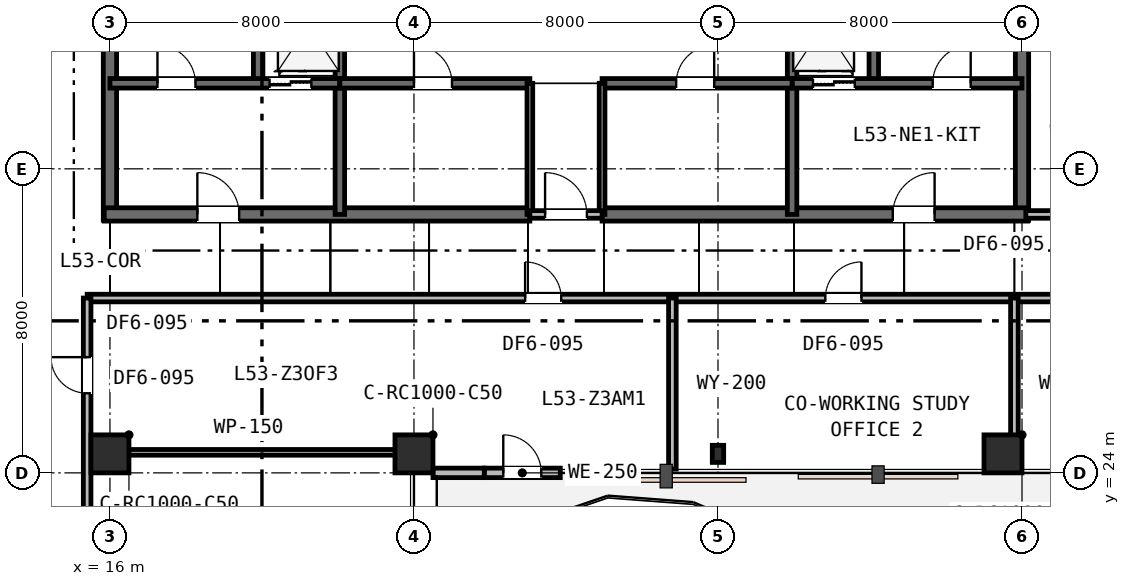
"""IFC4 building model, lengths in metres.
Left out: names, types, materials, properties, quantities, classifications, styles, units other than length and angle.
Written with IfcOpenShell. Run it as: python <this file> out.ifc"""

import sys

from ifc_helpers import new_model, si_unit, direction, frame, frame_2d, origin, origin_2d, place, context, subcontext, project, spatial, rectangle, i_section, extrude, element, fill, save


model = new_model("IFC4")
c1 = context("Model", 3, precision=1e-05, world=origin(), true_north=direction((0.0, 1.0)))
c2 = subcontext(c1, "Body", "Model", "MODEL_VIEW")
j1 = project(units=[si_unit("LENGTHUNIT", "METRE"), si_unit("PLANEANGLEUNIT", "RADIAN")], contexts=[c1])
p1 = place(None, origin())
s1 = spatial("IfcSite", under=j1, at=p1, CompositionType="ELEMENT")
p2 = place(p1, origin())
s2 = spatial("IfcBuilding", under=s1, at=p2, CompositionType="ELEMENT")
p3 = place(p2, frame((0.0, 0.0, 204.6)))
s3 = spatial("IfcBuildingStorey", under=s2, at=p3, CompositionType="ELEMENT", Elevation=204.6)
for number, where, z_axis, x_axis in (
    (1, (16.0, 30.65, 0.0), (0.0, 0.0, 1.0), (0.0, 1.0, 0.0)),
    (2, (40.0, 30.65, 0.0), (0.0, 0.0, 1.0), (0.0, 1.0, 0.0)),
):
    element("IfcWall", number, at=place(p3, frame(where, z_axis=z_axis, x_axis=x_axis)), inside=s3, PredefinedType="SHEAR", context=c2, shape_type="SweptSolid", body=[
        extrude(rectangle(XDim=12.3, YDim=0.35, at=frame_2d((6.15, 0.0))), origin(), (0.0, 0.0, 1.0), 3.6),
    ])
p4 = place(p3, frame((15.85, 30.8, 0.0), z_axis=(0.0, 0.0, 1.0), x_axis=(1.0, 0.0, 0.0)))
e3 = element("IfcWall", 3, at=p4, inside=s3, PredefinedType="SHEAR", context=c2, shape_type="SweptSolid", body=[
    extrude(rectangle(XDim=11.2, YDim=0.35, at=frame_2d((5.6, 0.0))), origin(), (0.0, 0.0, 1.0), 3.6),
])
p5 = place(p4, frame((2.45, 0.0, 0.0)))
e4 = element("IfcOpeningElement", 4, at=p5, cuts=e3, PredefinedType="OPENING", context=c2, shape_type="SweptSolid", body=[
    extrude(rectangle(XDim=1.1, YDim=2.15, at=frame_2d((0.55, 1.075))), frame((0.0, 0.185, 0.0), z_axis=(0.0, -1.0, 0.0), x_axis=(1.0, 0.0, 0.0)), (0.0, 0.0, 1.0), 0.37),
])
p6 = place(p3, frame((28.95, 30.8, 0.0), z_axis=(0.0, 0.0, 1.0), x_axis=(1.0, 0.0, 0.0)))
e5 = element("IfcWall", 5, at=p6, inside=s3, PredefinedType="SHEAR", context=c2, shape_type="SweptSolid", body=[
    extrude(rectangle(XDim=11.2, YDim=0.35, at=frame_2d((5.6, 0.0))), origin(), (0.0, 0.0, 1.0), 3.6),
])
p7 = place(p6, frame((7.65, 0.0, 0.0)))
e6 = element("IfcOpeningElement", 6, at=p7, cuts=e5, PredefinedType="OPENING", context=c2, shape_type="SweptSolid", body=[
    extrude(rectangle(XDim=1.1, YDim=2.15, at=frame_2d((0.55, 1.075))), frame((0.0, 0.185, 0.0), z_axis=(0.0, -1.0, 0.0), x_axis=(1.0, 0.0, 0.0)), (0.0, 0.0, 1.0), 0.37),
])
for number, where, z_axis, x_axis in (
    (7, (19.9, 34.25, 0.0), (0.0, 0.0, 1.0), (0.0, 1.0, 0.0)),
    (8, (36.1, 34.25, 0.0), (0.0, 0.0, 1.0), (0.0, 1.0, 0.0)),
):
    element("IfcWall", number, at=place(p3, frame(where, z_axis=z_axis, x_axis=x_axis)), inside=s3, PredefinedType="SHEAR", context=c2, shape_type="SweptSolid", body=[
        extrude(rectangle(XDim=8.65, YDim=0.25, at=frame_2d((4.325, 0.0))), origin(), (0.0, 0.0, 1.0), 3.6),
    ])
for number, where, z_axis, x_axis in (
    (9, (22.05, 30.8, 0.0), (0.0, 0.0, 1.0), (0.0, 1.0, 0.0)),
    (10, (33.95, 30.8, 0.0), (0.0, 0.0, 1.0), (0.0, 1.0, 0.0)),
):
    element("IfcWall", number, at=place(p3, frame(where, z_axis=z_axis, x_axis=x_axis)), inside=s3, PredefinedType="SHEAR", context=c2, shape_type="SweptSolid", body=[
        extrude(rectangle(XDim=6.45, YDim=0.25, at=frame_2d((3.225, 0.0))), origin(), (0.0, 0.0, 1.0), 3.6),
    ])
p8 = place(p3, frame((16.0, 34.25, 0.0), z_axis=(0.0, 0.0, 1.0), x_axis=(1.0, 0.0, 0.0)))
e11 = element("IfcWall", 11, at=p8, inside=s3, PredefinedType="SHEAR", context=c2, shape_type="SweptSolid", body=[
    extrude(rectangle(XDim=6.05, YDim=0.25, at=frame_2d((3.025, 0.0))), origin(), (0.0, 0.0, 1.0), 3.6),
])
p9 = place(p8, frame((1.25, 0.0, 0.0)))
e12 = element("IfcOpeningElement", 12, at=p9, cuts=e11, PredefinedType="OPENING", context=c2, shape_type="SweptSolid", body=[
    extrude(rectangle(XDim=1.0, YDim=2.15, at=frame_2d((0.5, 1.075))), frame((0.0, 0.135, 0.0), z_axis=(0.0, -1.0, 0.0), x_axis=(1.0, 0.0, 0.0)), (0.0, 0.0, 1.0), 0.27),
])
p10 = place(p8, frame((4.2, 0.0, 0.0)))
e13 = element("IfcOpeningElement", 13, at=p10, cuts=e11, PredefinedType="OPENING", context=c2, shape_type="SweptSolid", body=[
    extrude(rectangle(XDim=1.1, YDim=2.15, at=frame_2d((0.55, 1.075))), frame((0.0, 0.135, 0.0), z_axis=(0.0, -1.0, 0.0), x_axis=(1.0, 0.0, 0.0)), (0.0, 0.0, 1.0), 0.27),
])
p11 = place(p3, frame((33.95, 34.25, 0.0), z_axis=(0.0, 0.0, 1.0), x_axis=(1.0, 0.0, 0.0)))
e14 = element("IfcWall", 14, at=p11, inside=s3, PredefinedType="SHEAR", context=c2, shape_type="SweptSolid", body=[
    extrude(rectangle(XDim=6.05, YDim=0.25, at=frame_2d((3.025, 0.0))), origin(), (0.0, 0.0, 1.0), 3.6),
])
p12 = place(p11, frame((3.7, 0.0, 0.0)))
e15 = element("IfcOpeningElement", 15, at=p12, cuts=e14, PredefinedType="OPENING", context=c2, shape_type="SweptSolid", body=[
    extrude(rectangle(XDim=1.0, YDim=2.15, at=frame_2d((0.5, 1.075))), frame((0.0, 0.135, 0.0), z_axis=(0.0, -1.0, 0.0), x_axis=(1.0, 0.0, 0.0)), (0.0, 0.0, 1.0), 0.27),
])
p13 = place(p11, frame((0.55, 0.0, 0.0)))
e16 = element("IfcOpeningElement", 16, at=p13, cuts=e14, PredefinedType="OPENING", context=c2, shape_type="SweptSolid", body=[
    extrude(rectangle(XDim=1.1, YDim=2.15, at=frame_2d((0.55, 1.075))), frame((0.0, 0.135, 0.0), z_axis=(0.0, -1.0, 0.0), x_axis=(1.0, 0.0, 0.0)), (0.0, 0.0, 1.0), 0.27),
])
p14 = place(p3, frame((22.05, 34.25, 0.0), z_axis=(0.0, 0.0, 1.0), x_axis=(1.0, 0.0, 0.0)))
e17 = element("IfcWall", 17, at=p14, inside=s3, PredefinedType="SHEAR", context=c2, shape_type="SweptSolid", body=[
    extrude(rectangle(XDim=5.0, YDim=0.25, at=frame_2d((2.5, 0.0))), origin(), (0.0, 0.0, 1.0), 3.6),
])
p15 = place(p14, frame((1.95, 0.0, 0.0)))
e18 = element("IfcOpeningElement", 18, at=p15, cuts=e17, PredefinedType="OPENING", context=c2, shape_type="SweptSolid", body=[
    extrude(rectangle(XDim=1.0, YDim=2.15, at=frame_2d((0.5, 1.075))), frame((0.0, 0.135, 0.0), z_axis=(0.0, -1.0, 0.0), x_axis=(1.0, 0.0, 0.0)), (0.0, 0.0, 1.0), 0.27),
])
p16 = place(p3, frame((28.95, 34.25, 0.0), z_axis=(0.0, 0.0, 1.0), x_axis=(1.0, 0.0, 0.0)))
e19 = element("IfcWall", 19, at=p16, inside=s3, PredefinedType="SHEAR", context=c2, shape_type="SweptSolid", body=[
    extrude(rectangle(XDim=5.0, YDim=0.25, at=frame_2d((2.5, 0.0))), origin(), (0.0, 0.0, 1.0), 3.6),
])
p17 = place(p16, frame((1.95, 0.0, 0.0)))
e20 = element("IfcOpeningElement", 20, at=p17, cuts=e19, PredefinedType="OPENING", context=c2, shape_type="SweptSolid", body=[
    extrude(rectangle(XDim=1.0, YDim=2.15, at=frame_2d((0.5, 1.075))), frame((0.0, 0.135, 0.0), z_axis=(0.0, -1.0, 0.0), x_axis=(1.0, 0.0, 0.0)), (0.0, 0.0, 1.0), 0.27),
])
for number, where, z_axis, x_axis in (
    (21, (16.0, 24.5, 0.0), (0.0, 0.0, 1.0), (1.0, 0.0, 0.0)),
    (22, (24.0, 24.5, 0.0), (0.0, 0.0, 1.0), (1.0, 0.0, 0.0)),
):
    element("IfcColumn", number, at=place(p3, frame(where, z_axis=z_axis, x_axis=x_axis)), inside=s3, PredefinedType="COLUMN", context=c2, shape_type="SweptSolid", body=[
        extrude(rectangle(XDim=1.0, YDim=1.0, at=origin_2d()), origin(), (0.0, 0.0, 1.0), 3.6),
    ])
p18 = place(p3, frame((32.0, 24.5, 0.0), z_axis=(0.0, 0.0, 1.0), x_axis=(1.0, 0.0, 0.0)))
e23 = element("IfcColumn", 23, at=p18, inside=s3, PredefinedType="COLUMN", context=c2, shape_type="SweptSolid", body=[
    extrude(i_section(OverallWidth=0.3, OverallDepth=0.45, WebThickness=0.014, FlangeThickness=0.026, FilletRadius=0.027, at=origin_2d()), origin(), (0.0, 0.0, 1.0), 3.6),
])
p19 = place(p3, frame((39.5, 24.5, 0.0), z_axis=(0.0, 0.0, 1.0), x_axis=(1.0, 0.0, 0.0)))
e24 = element("IfcColumn", 24, at=p19, inside=s3, PredefinedType="COLUMN", context=c2, shape_type="SweptSolid", body=[
    extrude(rectangle(XDim=1.0, YDim=1.0, at=origin_2d()), origin(), (0.0, 0.0, 1.0), 3.6),
])
p20 = place(p3, frame((25.85, 24.0, 0.0), z_axis=(0.0, 0.0, 1.0), x_axis=(1.0, 0.0, 0.0)))
e25 = element("IfcWall", 25, at=p20, inside=s3, PredefinedType="STANDARD", context=c2, shape_type="SweptSolid", body=[
    extrude(rectangle(XDim=2.0, YDim=0.25, at=frame_2d((1.0, 0.0))), origin(), (0.0, 0.0, 1.0), 2.95),
])
p21 = place(p20, frame((0.5, 0.0, 0.0)))
e26 = element("IfcOpeningElement", 26, at=p21, cuts=e25, PredefinedType="OPENING", context=c2, shape_type="SweptSolid", body=[
    extrude(rectangle(XDim=1.0, YDim=2.15, at=frame_2d((0.5, 1.075))), frame((0.0, 0.135, 0.0), z_axis=(0.0, -1.0, 0.0), x_axis=(1.0, 0.0, 0.0)), (0.0, 0.0, 1.0), 0.27),
])
p22 = place(p3, frame((24.5, 24.0, 0.0), z_axis=(0.0, 0.0, 1.0), x_axis=(1.0, 0.0, 0.0)))
e27 = element("IfcWall", 27, at=p22, inside=s3, PredefinedType="STANDARD", context=c2, shape_type="SweptSolid", body=[
    extrude(rectangle(XDim=1.35, YDim=0.25, at=frame_2d((0.675, 0.0))), origin(), (0.0, 0.0, 1.0), 2.95),
])
for number, where, z_axis, x_axis in (
    (28, (27.05, 30.8, 0.0), (0.0, 0.0, 1.0), (0.0, 1.0, 0.0)),
    (29, (28.95, 30.8, 0.0), (0.0, 0.0, 1.0), (0.0, 1.0, 0.0)),
):
    element("IfcWall", number, at=place(p3, frame(where, z_axis=z_axis, x_axis=x_axis)), inside=s3, PredefinedType="PLUMBINGWALL", context=c2, shape_type="SweptSolid", body=[
        extrude(rectangle(XDim=3.45, YDim=0.15, at=frame_2d((1.725, 0.0))), origin(), (0.0, 0.0, 1.0), 2.93),
    ])
p23 = place(p3, frame((27.05, 30.8, 0.0), z_axis=(0.0, 0.0, 1.0), x_axis=(1.0, 0.0, 0.0)))
e30 = element("IfcWall", 30, at=p23, inside=s3, PredefinedType="PARTITIONING", context=c2, shape_type="SweptSolid", body=[
    extrude(rectangle(XDim=1.9, YDim=0.2, at=frame_2d((0.95, 0.0))), origin(), (0.0, 0.0, 1.0), 2.93),
])
p24 = place(p23, frame((0.4, 0.0, 0.0)))
e31 = element("IfcOpeningElement", 31, at=p24, cuts=e30, PredefinedType="OPENING", context=c2, shape_type="SweptSolid", body=[
    extrude(rectangle(XDim=1.1, YDim=2.15, at=frame_2d((0.55, 1.075))), frame((0.0, 0.11, 0.0), z_axis=(0.0, -1.0, 0.0), x_axis=(1.0, 0.0, 0.0)), (0.0, 0.0, 1.0), 0.22),
])
p25 = place(p3, frame((15.4, 28.6, 0.0), z_axis=(0.0, 0.0, 1.0), x_axis=(1.0, 0.0, 0.0)))
e32 = element("IfcWall", 32, at=p25, inside=s3, PredefinedType="PARTITIONING", context=c2, shape_type="SweptSolid", body=[
    extrude(rectangle(XDim=35.5, YDim=0.2, at=frame_2d((17.75, 0.0))), origin(), (0.0, 0.0, 1.0), 2.63),
])
p26 = place(p25, frame((11.525, 0.0, 0.0)))
e33 = element("IfcOpeningElement", 33, at=p26, cuts=e32, PredefinedType="OPENING", context=c2, shape_type="SweptSolid", body=[
    extrude(rectangle(XDim=0.95, YDim=2.15, at=frame_2d((0.475, 1.075))), frame((0.0, 0.11, 0.0), z_axis=(0.0, -1.0, 0.0), x_axis=(1.0, 0.0, 0.0)), (0.0, 0.0, 1.0), 0.22),
])
p27 = place(p25, frame((19.425, 0.0, 0.0)))
e34 = element("IfcOpeningElement", 34, at=p27, cuts=e32, PredefinedType="OPENING", context=c2, shape_type="SweptSolid", body=[
    extrude(rectangle(XDim=0.95, YDim=2.15, at=frame_2d((0.475, 1.075))), frame((0.0, 0.11, 0.0), z_axis=(0.0, -1.0, 0.0), x_axis=(1.0, 0.0, 0.0)), (0.0, 0.0, 1.0), 0.22),
])
p28 = place(p25, frame((26.275, 0.0, 0.0)))
e35 = element("IfcOpeningElement", 35, at=p28, cuts=e32, PredefinedType="OPENING", context=c2, shape_type="SweptSolid", body=[
    extrude(rectangle(XDim=0.95, YDim=2.15, at=frame_2d((0.475, 1.075))), frame((0.0, 0.11, 0.0), z_axis=(0.0, -1.0, 0.0), x_axis=(1.0, 0.0, 0.0)), (0.0, 0.0, 1.0), 0.22),
])
p29 = place(p3, frame((40.1, 30.8, 0.0), z_axis=(0.0, 0.0, 1.0), x_axis=(1.0, 0.0, 0.0)))
e36 = element("IfcWall", 36, at=p29, inside=s3, PredefinedType="PARTITIONING", context=c2, shape_type="SweptSolid", body=[
    extrude(rectangle(XDim=3.1, YDim=0.2, at=frame_2d((1.55, 0.0))), origin(), (0.0, 0.0, 1.0), 2.63),
])
p30 = place(p29, frame((1.075, 0.0, 0.0)))
e37 = element("IfcOpeningElement", 37, at=p30, cuts=e36, PredefinedType="OPENING", context=c2, shape_type="SweptSolid", body=[
    extrude(rectangle(XDim=0.95, YDim=2.15, at=frame_2d((0.475, 1.075))), frame((0.0, 0.11, 0.0), z_axis=(0.0, -1.0, 0.0), x_axis=(1.0, 0.0, 0.0)), (0.0, 0.0, 1.0), 0.22),
])
p31 = place(p3, frame((30.8, 24.1, 0.0), z_axis=(0.0, 0.0, 1.0), x_axis=(0.0, 1.0, 0.0)))
e38 = element("IfcWall", 38, at=p31, inside=s3, PredefinedType="PARTITIONING", context=c2, shape_type="SweptSolid", body=[
    extrude(rectangle(XDim=4.5, YDim=0.2, at=frame_2d((2.25, 0.0))), origin(), (0.0, 0.0, 1.0), 2.95),
])
p32 = place(p3, frame((39.8, 24.1, 0.0), z_axis=(0.0, 0.0, 1.0), x_axis=(0.0, 1.0, 0.0)))
e39 = element("IfcWall", 39, at=p32, inside=s3, PredefinedType="PARTITIONING", context=c2, shape_type="SweptSolid", body=[
    extrude(rectangle(XDim=4.5, YDim=0.2, at=frame_2d((2.25, 0.0))), origin(), (0.0, 0.0, 1.0), 2.63),
])
p33 = place(p3, frame((15.4, 24.54, 0.0), z_axis=(0.0, 0.0, 1.0), x_axis=(1.0, 0.0, 0.0)))
e40 = element("IfcWall", 40, at=p33, inside=s3, PredefinedType="PARTITIONING", context=c2, shape_type="SweptSolid", body=[
    extrude(rectangle(XDim=8.5, YDim=0.15, at=frame_2d((4.25, 0.0))), origin(), (0.0, 0.0, 1.0), 2.63),
])
p34 = place(p3, frame((15.4, 17.0, 0.0), z_axis=(0.0, 0.0, 1.0), x_axis=(0.0, 1.0, 0.0)))
e41 = element("IfcWall", 41, at=p34, inside=s3, PredefinedType="PARTITIONING", context=c2, shape_type="SweptSolid", body=[
    extrude(rectangle(XDim=11.6, YDim=0.2, at=frame_2d((5.8, 0.0))), origin(), (0.0, 0.0, 1.0), 2.63),
])
p35 = place(p34, frame((9.095, 0.0, 0.0)))
e42 = element("IfcOpeningElement", 42, at=p35, cuts=e41, PredefinedType="OPENING", context=c2, shape_type="SweptSolid", body=[
    extrude(rectangle(XDim=0.95, YDim=2.15, at=frame_2d((0.475, 1.075))), frame((0.0, 0.11, 0.0), z_axis=(0.0, -1.0, 0.0), x_axis=(1.0, 0.0, 0.0)), (0.0, 0.0, 1.0), 0.22),
])
p36 = place(p34, frame((3.295, 0.0, 0.0)))
e43 = element("IfcOpeningElement", 43, at=p36, cuts=e41, PredefinedType="OPENING", context=c2, shape_type="SweptSolid", body=[
    extrude(rectangle(XDim=0.95, YDim=2.15, at=frame_2d((0.475, 1.075))), frame((0.0, 0.11, 0.0), z_axis=(0.0, -1.0, 0.0), x_axis=(1.0, 0.0, 0.0)), (0.0, 0.0, 1.0), 0.22),
])
p37 = place(p21, origin())
e44 = element("IfcDoor", 44, at=p37, inside=s3, OperationType="SINGLE_SWING_LEFT", PredefinedType="DOOR", context=c2, shape_type="SweptSolid", body=[
    extrude(rectangle(XDim=1.0, YDim=2.15, at=frame_2d((0.5, 1.075))), frame((0.0, 0.025, 0.0), z_axis=(0.0, -1.0, 0.0), x_axis=(1.0, 0.0, 0.0)), (0.0, 0.0, 1.0), 0.05),
])
fill(e26, e44)
p38 = place(p24, origin())
e45 = element("IfcDoor", 45, at=p38, inside=s3, OperationType="SINGLE_SWING_LEFT", PredefinedType="DOOR", context=c2, shape_type="SweptSolid", body=[
    extrude(rectangle(XDim=1.1, YDim=2.15, at=frame_2d((0.55, 1.075))), frame((0.0, 0.025, 0.0), z_axis=(0.0, -1.0, 0.0), x_axis=(1.0, 0.0, 0.0)), (0.0, 0.0, 1.0), 0.05),
])
fill(e31, e45)
p39 = place(p9, origin())
e46 = element("IfcDoor", 46, at=p39, inside=s3, OperationType="SINGLE_SWING_LEFT", PredefinedType="DOOR", context=c2, shape_type="SweptSolid", body=[
    extrude(rectangle(XDim=1.0, YDim=2.15, at=frame_2d((0.5, 1.075))), frame((0.0, 0.025, 0.0), z_axis=(0.0, -1.0, 0.0), x_axis=(1.0, 0.0, 0.0)), (0.0, 0.0, 1.0), 0.05),
])
fill(e12, e46)
p40 = place(p12, origin())
e47 = element("IfcDoor", 47, at=p40, inside=s3, OperationType="SINGLE_SWING_RIGHT", PredefinedType="DOOR", context=c2, shape_type="SweptSolid", body=[
    extrude(rectangle(XDim=1.0, YDim=2.15, at=frame_2d((0.5, 1.075))), frame((0.0, 0.025, 0.0), z_axis=(0.0, -1.0, 0.0), x_axis=(1.0, 0.0, 0.0)), (0.0, 0.0, 1.0), 0.05),
])
fill(e15, e47)
p41 = place(p5, origin())
e48 = element("IfcDoor", 48, at=p41, inside=s3, OperationType="SINGLE_SWING_LEFT", PredefinedType="DOOR", context=c2, shape_type="SweptSolid", body=[
    extrude(rectangle(XDim=1.1, YDim=2.15, at=frame_2d((0.55, 1.075))), frame((0.0, 0.025, 0.0), z_axis=(0.0, -1.0, 0.0), x_axis=(1.0, 0.0, 0.0)), (0.0, 0.0, 1.0), 0.05),
])
fill(e4, e48)
p42 = place(p7, origin())
e49 = element("IfcDoor", 49, at=p42, inside=s3, OperationType="SINGLE_SWING_RIGHT", PredefinedType="DOOR", context=c2, shape_type="SweptSolid", body=[
    extrude(rectangle(XDim=1.1, YDim=2.15, at=frame_2d((0.55, 1.075))), frame((0.0, 0.025, 0.0), z_axis=(0.0, -1.0, 0.0), x_axis=(1.0, 0.0, 0.0)), (0.0, 0.0, 1.0), 0.05),
])
fill(e6, e49)
p43 = place(p15, origin())
e50 = element("IfcDoor", 50, at=p43, inside=s3, OperationType="SINGLE_SWING_LEFT", PredefinedType="DOOR", context=c2, shape_type="SweptSolid", body=[
    extrude(rectangle(XDim=1.0, YDim=2.15, at=frame_2d((0.5, 1.075))), frame((0.0, 0.025, 0.0), z_axis=(0.0, -1.0, 0.0), x_axis=(1.0, 0.0, 0.0)), (0.0, 0.0, 1.0), 0.05),
])
fill(e18, e50)
p44 = place(p17, origin())
e51 = element("IfcDoor", 51, at=p44, inside=s3, OperationType="SINGLE_SWING_RIGHT", PredefinedType="DOOR", context=c2, shape_type="SweptSolid", body=[
    extrude(rectangle(XDim=1.0, YDim=2.15, at=frame_2d((0.5, 1.075))), frame((0.0, 0.025, 0.0), z_axis=(0.0, -1.0, 0.0), x_axis=(1.0, 0.0, 0.0)), (0.0, 0.0, 1.0), 0.05),
])
fill(e20, e51)
p45 = place(p26, origin())
e52 = element("IfcDoor", 52, at=p45, inside=s3, OperationType="SINGLE_SWING_LEFT", PredefinedType="DOOR", context=c2, shape_type="SweptSolid", body=[
    extrude(rectangle(XDim=0.95, YDim=2.15, at=frame_2d((0.475, 1.075))), frame((0.0, 0.025, 0.0), z_axis=(0.0, -1.0, 0.0), x_axis=(1.0, 0.0, 0.0)), (0.0, 0.0, 1.0), 0.05),
])
fill(e33, e52)
p46 = place(p27, origin())
e53 = element("IfcDoor", 53, at=p46, inside=s3, OperationType="SINGLE_SWING_RIGHT", PredefinedType="DOOR", context=c2, shape_type="SweptSolid", body=[
    extrude(rectangle(XDim=0.95, YDim=2.15, at=frame_2d((0.475, 1.075))), frame((0.0, 0.025, 0.0), z_axis=(0.0, -1.0, 0.0), x_axis=(1.0, 0.0, 0.0)), (0.0, 0.0, 1.0), 0.05),
])
fill(e34, e53)
p47 = place(p35, origin())
e54 = element("IfcDoor", 54, at=p47, inside=s3, OperationType="SINGLE_SWING_RIGHT", PredefinedType="DOOR", context=c2, shape_type="SweptSolid", body=[
    extrude(rectangle(XDim=0.95, YDim=2.15, at=frame_2d((0.475, 1.075))), frame((0.0, 0.025, 0.0), z_axis=(0.0, -1.0, 0.0), x_axis=(1.0, 0.0, 0.0)), (0.0, 0.0, 1.0), 0.05),
])
fill(e42, e54)
p48 = place(p10, origin())
e55 = element("IfcDoor", 55, at=p48, inside=s3, OperationType="DOUBLE_DOOR_SLIDING", PredefinedType="DOOR", context=c2, shape_type="SweptSolid", body=[
    extrude(rectangle(XDim=1.1, YDim=2.15, at=frame_2d((0.55, 1.075))), frame((0.0, 0.025, 0.0), z_axis=(0.0, -1.0, 0.0), x_axis=(1.0, 0.0, 0.0)), (0.0, 0.0, 1.0), 0.05),
])
fill(e13, e55)
p49 = place(p13, origin())
e56 = element("IfcDoor", 56, at=p49, inside=s3, OperationType="DOUBLE_DOOR_SLIDING", PredefinedType="DOOR", context=c2, shape_type="SweptSolid", body=[
    extrude(rectangle(XDim=1.1, YDim=2.15, at=frame_2d((0.55, 1.075))), frame((0.0, 0.025, 0.0), z_axis=(0.0, -1.0, 0.0), x_axis=(1.0, 0.0, 0.0)), (0.0, 0.0, 1.0), 0.05),
])
fill(e16, e56)
save(model, sys.argv[1])
